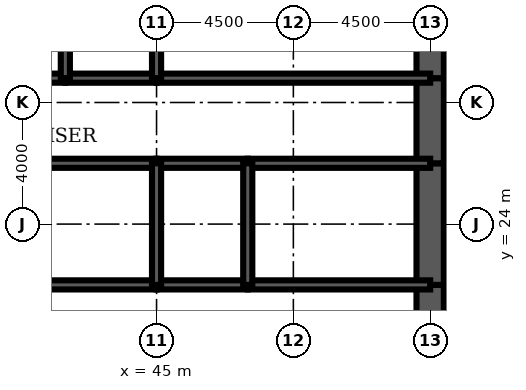
"""IFC4 building model, lengths in metres.
Left out: names, types, materials, properties, quantities, classifications, styles, units other than length and angle.
Written with IfcOpenShell. Run it as: python <this file> out.ifc"""

import sys

from ifc_helpers import new_model, si_unit, direction, frame, frame_2d, origin, place, context, subcontext, project, spatial, rectangle, extrude, element, fill, save


model = new_model("IFC4")
c1 = context("Model", 3, precision=1e-05, world=origin(), true_north=direction((0.0, 1.0)))
c2 = subcontext(c1, "Body", "Model", "MODEL_VIEW")
j1 = project(units=[si_unit("LENGTHUNIT", "METRE"), si_unit("PLANEANGLEUNIT", "RADIAN")], contexts=[c1])
p1 = place(None, origin())
s1 = spatial("IfcSite", under=j1, at=p1, CompositionType="ELEMENT")
p2 = place(p1, origin())
s2 = spatial("IfcBuilding", under=s1, at=p2, CompositionType="ELEMENT")
p3 = place(p2, frame((0.0, 0.0, 150.9)))
s3 = spatial("IfcBuildingStorey", under=s2, at=p3, CompositionType="ELEMENT", Elevation=150.9)
p4 = place(p3, frame((54.0, 19.2, 0.0), z_axis=(0.0, 0.0, 1.0), x_axis=(0.0, 1.0, 0.0)))
e1 = element("IfcWall", 1, at=p4, inside=s3, PredefinedType="SHEAR", context=c2, shape_type="SweptSolid", body=[
    extrude(rectangle(XDim=2.8, YDim=0.9, at=frame_2d((1.4, 0.0))), origin(), (0.0, 0.0, 1.0), 4.2),
])
p5 = place(p4, frame((0.4, 0.0, 0.0)))
e2 = element("IfcOpeningElement", 2, at=p5, cuts=e1, PredefinedType="OPENING", context=c2, shape_type="SweptSolid", body=[
    extrude(rectangle(XDim=1.8, YDim=2.1, at=frame_2d((0.9, 1.05))), frame((0.0, 0.46, 0.0), z_axis=(0.0, -1.0, 0.0), x_axis=(1.0, 0.0, 0.0)), (0.0, 0.0, 1.0), 0.92),
])
p6 = place(p3, frame((54.0, 22.0, 0.0), z_axis=(0.0, 0.0, 1.0), x_axis=(0.0, 1.0, 0.0)))
e3 = element("IfcWall", 3, at=p6, inside=s3, PredefinedType="SHEAR", context=c2, shape_type="SweptSolid", body=[
    extrude(rectangle(XDim=4.0, YDim=0.9, at=frame_2d((2.0, 0.0))), origin(), (0.0, 0.0, 1.0), 4.2),
])
p7 = place(p3, frame((54.0, 26.0, 0.0), z_axis=(0.0, 0.0, 1.0), x_axis=(0.0, 1.0, 0.0)))
e4 = element("IfcWall", 4, at=p7, inside=s3, PredefinedType="SHEAR", context=c2, shape_type="SweptSolid", body=[
    extrude(rectangle(XDim=2.8, YDim=0.9, at=frame_2d((1.4, 0.0))), origin(), (0.0, 0.0, 1.0), 4.2),
])
p8 = place(p7, frame((0.6, 0.0, 0.0)))
e5 = element("IfcOpeningElement", 5, at=p8, cuts=e4, PredefinedType="OPENING", context=c2, shape_type="SweptSolid", body=[
    extrude(rectangle(XDim=1.8, YDim=2.1, at=frame_2d((0.9, 1.05))), frame((0.0, 0.46, 0.0), z_axis=(0.0, -1.0, 0.0), x_axis=(1.0, 0.0, 0.0)), (0.0, 0.0, 1.0), 0.92),
])
p9 = place(p3, frame((54.0, 28.8, 0.0), z_axis=(0.0, 0.0, 1.0), x_axis=(0.0, 1.0, 0.0)))
e6 = element("IfcWall", 6, at=p9, inside=s3, PredefinedType="SHEAR", context=c2, shape_type="SweptSolid", body=[
    extrude(rectangle(XDim=3.2, YDim=0.9, at=frame_2d((1.6, 0.0))), origin(), (0.0, 0.0, 1.0), 4.2),
])
p10 = place(p3, frame((39.0, 28.8, 0.0), z_axis=(0.0, 0.0, 1.0), x_axis=(1.0, 0.0, 0.0)))
e7 = element("IfcWall", 7, at=p10, inside=s3, PredefinedType="SOLIDWALL", context=c2, shape_type="SweptSolid", body=[
    extrude(rectangle(XDim=3.0, YDim=0.3, at=frame_2d((1.5, 0.0))), origin(), (0.0, 0.0, 1.0), 4.2),
])
p11 = place(p3, frame((42.0, 28.8, 0.0), z_axis=(0.0, 0.0, 1.0), x_axis=(1.0, 0.0, 0.0)))
e8 = element("IfcWall", 8, at=p11, inside=s3, PredefinedType="SOLIDWALL", context=c2, shape_type="SweptSolid", body=[
    extrude(rectangle(XDim=3.0, YDim=0.3, at=frame_2d((1.5, 0.0))), origin(), (0.0, 0.0, 1.0), 4.2),
])
p12 = place(p11, frame((0.95, 0.0, 0.0)))
e9 = element("IfcOpeningElement", 9, at=p12, cuts=e8, PredefinedType="OPENING", context=c2, shape_type="SweptSolid", body=[
    extrude(rectangle(XDim=1.1, YDim=2.2, at=frame_2d((0.55, 1.1))), frame((0.0, 0.16, 0.0), z_axis=(0.0, -1.0, 0.0), x_axis=(1.0, 0.0, 0.0)), (0.0, 0.0, 1.0), 0.32),
])
p13 = place(p3, frame((45.0, 28.8, 0.0), z_axis=(0.0, 0.0, 1.0), x_axis=(1.0, 0.0, 0.0)))
e10 = element("IfcWall", 10, at=p13, inside=s3, PredefinedType="SOLIDWALL", context=c2, shape_type="SweptSolid", body=[
    extrude(rectangle(XDim=9.0, YDim=0.3, at=frame_2d((4.5, 0.0))), origin(), (0.0, 0.0, 1.0), 4.2),
])
p14 = place(p13, frame((7.35, 0.0, 0.0)))
e11 = element("IfcOpeningElement", 11, at=p14, cuts=e10, PredefinedType="OPENING", context=c2, shape_type="SweptSolid", body=[
    extrude(rectangle(XDim=1.0, YDim=2.1, at=frame_2d((0.5, 1.05))), frame((0.0, 0.16, 0.0), z_axis=(0.0, -1.0, 0.0), x_axis=(1.0, 0.0, 0.0)), (0.0, 0.0, 1.0), 0.32),
])
p15 = place(p3, frame((36.0, 22.0, 0.0), z_axis=(0.0, 0.0, 1.0), x_axis=(1.0, 0.0, 0.0)))
e12 = element("IfcWall", 12, at=p15, inside=s3, PredefinedType="SOLIDWALL", context=c2, shape_type="SweptSolid", body=[
    extrude(rectangle(XDim=9.0, YDim=0.3, at=frame_2d((4.5, 0.0))), origin(), (0.0, 0.0, 1.0), 4.2),
])
p16 = place(p15, frame((4.0, 0.0, 0.0)))
e13 = element("IfcOpeningElement", 13, at=p16, cuts=e12, PredefinedType="OPENING", context=c2, shape_type="SweptSolid", body=[
    extrude(rectangle(XDim=1.0, YDim=2.1, at=frame_2d((0.5, 1.05))), frame((0.0, 0.16, 0.0), z_axis=(0.0, -1.0, 0.0), x_axis=(1.0, 0.0, 0.0)), (0.0, 0.0, 1.0), 0.32),
])
p17 = place(p3, frame((45.0, 22.0, 0.0), z_axis=(0.0, 0.0, 1.0), x_axis=(1.0, 0.0, 0.0)))
e14 = element("IfcWall", 14, at=p17, inside=s3, PredefinedType="SOLIDWALL", context=c2, shape_type="SweptSolid", body=[
    extrude(rectangle(XDim=3.0, YDim=0.3, at=frame_2d((1.5, 0.0))), origin(), (0.0, 0.0, 1.0), 4.2),
])
p18 = place(p17, frame((1.0, 0.0, 0.0)))
e15 = element("IfcOpeningElement", 15, at=p18, cuts=e14, PredefinedType="OPENING", context=c2, shape_type="SweptSolid", body=[
    extrude(rectangle(XDim=1.0, YDim=2.1, at=frame_2d((0.5, 1.05))), frame((0.0, 0.16, 0.0), z_axis=(0.0, -1.0, 0.0), x_axis=(1.0, 0.0, 0.0)), (0.0, 0.0, 1.0), 0.32),
])
p19 = place(p3, frame((48.0, 22.0, 0.0), z_axis=(0.0, 0.0, 1.0), x_axis=(1.0, 0.0, 0.0)))
e16 = element("IfcWall", 16, at=p19, inside=s3, PredefinedType="SOLIDWALL", context=c2, shape_type="SweptSolid", body=[
    extrude(rectangle(XDim=6.0, YDim=0.3, at=frame_2d((3.0, 0.0))), origin(), (0.0, 0.0, 1.0), 4.2),
])
p20 = place(p19, frame((2.0, 0.0, 0.0)))
e17 = element("IfcOpeningElement", 17, at=p20, cuts=e16, PredefinedType="OPENING", context=c2, shape_type="SweptSolid", body=[
    extrude(rectangle(XDim=1.0, YDim=2.1, at=frame_2d((0.5, 1.05))), frame((0.0, 0.16, 0.0), z_axis=(0.0, -1.0, 0.0), x_axis=(1.0, 0.0, 0.0)), (0.0, 0.0, 1.0), 0.32),
])
p21 = place(p19, frame((4.15, 0.0, 0.0)))
e18 = element("IfcOpeningElement", 18, at=p21, cuts=e16, PredefinedType="OPENING", context=c2, shape_type="SweptSolid", body=[
    extrude(rectangle(XDim=1.0, YDim=2.1, at=frame_2d((0.5, 1.05))), frame((0.0, 0.16, 0.0), z_axis=(0.0, -1.0, 0.0), x_axis=(1.0, 0.0, 0.0)), (0.0, 0.0, 1.0), 0.32),
])
p22 = place(p3, frame((36.0, 26.0, 0.0), z_axis=(0.0, 0.0, 1.0), x_axis=(1.0, 0.0, 0.0)))
e19 = element("IfcWall", 19, at=p22, inside=s3, PredefinedType="SOLIDWALL", context=c2, shape_type="SweptSolid", body=[
    extrude(rectangle(XDim=9.0, YDim=0.3, at=frame_2d((4.5, 0.0))), origin(), (0.0, 0.0, 1.0), 4.2),
])
p23 = place(p3, frame((45.0, 26.0, 0.0), z_axis=(0.0, 0.0, 1.0), x_axis=(1.0, 0.0, 0.0)))
e20 = element("IfcWall", 20, at=p23, inside=s3, PredefinedType="SOLIDWALL", context=c2, shape_type="SweptSolid", body=[
    extrude(rectangle(XDim=3.0, YDim=0.3, at=frame_2d((1.5, 0.0))), origin(), (0.0, 0.0, 1.0), 4.2),
])
p24 = place(p3, frame((48.0, 26.0, 0.0), z_axis=(0.0, 0.0, 1.0), x_axis=(1.0, 0.0, 0.0)))
e21 = element("IfcWall", 21, at=p24, inside=s3, PredefinedType="SOLIDWALL", context=c2, shape_type="SweptSolid", body=[
    extrude(rectangle(XDim=6.0, YDim=0.3, at=frame_2d((3.0, 0.0))), origin(), (0.0, 0.0, 1.0), 4.2),
])
for number, where, z_axis, x_axis in (
    (22, (42.0, 28.8, 0.0), (0.0, 0.0, 1.0), (0.0, 1.0, 0.0)),
    (23, (45.0, 28.8, 0.0), (0.0, 0.0, 1.0), (0.0, 1.0, 0.0)),
):
    element("IfcWall", number, at=place(p3, frame(where, z_axis=z_axis, x_axis=x_axis)), inside=s3, PredefinedType="SOLIDWALL", context=c2, shape_type="SweptSolid", body=[
        extrude(rectangle(XDim=3.2, YDim=0.3, at=frame_2d((1.6, 0.0))), origin(), (0.0, 0.0, 1.0), 4.2),
    ])
for number, where, z_axis, x_axis in (
    (24, (45.0, 22.0, 0.0), (0.0, 0.0, 1.0), (0.0, 1.0, 0.0)),
    (25, (48.0, 22.0, 0.0), (0.0, 0.0, 1.0), (0.0, 1.0, 0.0)),
):
    element("IfcWall", number, at=place(p3, frame(where, z_axis=z_axis, x_axis=x_axis)), inside=s3, PredefinedType="SOLIDWALL", context=c2, shape_type="SweptSolid", body=[
        extrude(rectangle(XDim=4.0, YDim=0.3, at=frame_2d((2.0, 0.0))), origin(), (0.0, 0.0, 1.0), 4.2),
    ])
p25 = place(p3, frame((42.5, 22.15, 0.0), z_axis=(0.0, 0.0, 1.0), x_axis=(0.0, 1.0, 0.0)))
e26 = element("IfcWall", 26, at=p25, inside=s3, PredefinedType="PARTITIONING", context=c2, shape_type="SweptSolid", body=[
    extrude(rectangle(XDim=3.7, YDim=0.15, at=frame_2d((1.85, 0.0))), origin(), (0.0, 0.0, 1.0), 3.0),
])
p26 = place(p25, frame((2.2, 0.0, 0.0)))
e27 = element("IfcOpeningElement", 27, at=p26, cuts=e26, PredefinedType="OPENING", context=c2, shape_type="SweptSolid", body=[
    extrude(rectangle(XDim=1.0, YDim=2.1, at=frame_2d((0.5, 1.05))), frame((0.0, 0.085, 0.0), z_axis=(0.0, -1.0, 0.0), x_axis=(1.0, 0.0, 0.0)), (0.0, 0.0, 1.0), 0.17),
])
p27 = place(p3, frame((51.675, 22.15, 0.0), z_axis=(0.0, 0.0, 1.0), x_axis=(0.0, 1.0, 0.0)))
e28 = element("IfcWall", 28, at=p27, inside=s3, PredefinedType="PARTITIONING", context=c2, shape_type="SweptSolid", body=[
    extrude(rectangle(XDim=3.7, YDim=0.15, at=frame_2d((1.85, 0.0))), origin(), (0.0, 0.0, 1.0), 3.0),
])
p28 = place(p3, frame((46.2, 26.15, 0.0), z_axis=(0.0, 0.0, 1.0), x_axis=(0.0, 1.0, 0.0)))
e29 = element("IfcWall", 29, at=p28, inside=s3, PredefinedType="PARTITIONING", context=c2, shape_type="SweptSolid", body=[
    extrude(rectangle(XDim=2.5, YDim=0.15, at=frame_2d((1.25, 0.0))), origin(), (0.0, 0.0, 1.0), 3.0),
])
p29 = place(p28, frame((1.15, 0.0, 0.0)))
e30 = element("IfcOpeningElement", 30, at=p29, cuts=e29, PredefinedType="OPENING", context=c2, shape_type="SweptSolid", body=[
    extrude(rectangle(XDim=1.0, YDim=2.1, at=frame_2d((0.5, 1.05))), frame((0.0, 0.085, 0.0), z_axis=(0.0, -1.0, 0.0), x_axis=(1.0, 0.0, 0.0)), (0.0, 0.0, 1.0), 0.17),
])
p30 = place(p26, origin())
e31 = element("IfcDoor", 31, at=p30, inside=s3, OperationType="SINGLE_SWING_RIGHT", PredefinedType="DOOR", context=c2, shape_type="SweptSolid", body=[
    extrude(rectangle(XDim=1.0, YDim=2.1, at=frame_2d((0.5, 1.05))), frame((0.0, 0.025, 0.0), z_axis=(0.0, -1.0, 0.0), x_axis=(1.0, 0.0, 0.0)), (0.0, 0.0, 1.0), 0.05),
])
fill(e27, e31)
p31 = place(p29, origin())
e32 = element("IfcDoor", 32, at=p31, inside=s3, OperationType="SINGLE_SWING_RIGHT", PredefinedType="DOOR", context=c2, shape_type="SweptSolid", body=[
    extrude(rectangle(XDim=1.0, YDim=2.1, at=frame_2d((0.5, 1.05))), frame((0.0, 0.025, 0.0), z_axis=(0.0, -1.0, 0.0), x_axis=(1.0, 0.0, 0.0)), (0.0, 0.0, 1.0), 0.05),
])
fill(e30, e32)
p32 = place(p12, origin())
e33 = element("IfcDoor", 33, at=p32, inside=s3, OperationType="DOUBLE_DOOR_SLIDING", PredefinedType="USERDEFINED", context=c2, shape_type="SweptSolid", body=[
    extrude(rectangle(XDim=1.1, YDim=2.2, at=frame_2d((0.55, 1.1))), frame((0.0, 0.025, 0.0), z_axis=(0.0, -1.0, 0.0), x_axis=(1.0, 0.0, 0.0)), (0.0, 0.0, 1.0), 0.05),
])
fill(e9, e33)
p33 = place(p14, origin())
e34 = element("IfcDoor", 34, at=p33, inside=s3, OperationType="SINGLE_SWING_RIGHT", PredefinedType="DOOR", context=c2, shape_type="SweptSolid", body=[
    extrude(rectangle(XDim=1.0, YDim=2.1, at=frame_2d((0.5, 1.05))), frame((0.0, 0.025, 0.0), z_axis=(0.0, -1.0, 0.0), x_axis=(1.0, 0.0, 0.0)), (0.0, 0.0, 1.0), 0.05),
])
fill(e11, e34)
p34 = place(p5, origin())
e35 = element("IfcDoor", 35, at=p34, inside=s3, OperationType="SINGLE_SWING_LEFT", PredefinedType="DOOR", context=c2, shape_type="SweptSolid", body=[
    extrude(rectangle(XDim=1.8, YDim=2.1, at=frame_2d((0.9, 1.05))), frame((0.0, 0.45, 0.0), z_axis=(0.0, -1.0, 0.0), x_axis=(1.0, 0.0, 0.0)), (0.0, 0.0, 1.0), 0.899),
])
fill(e2, e35)
p35 = place(p8, origin())
e36 = element("IfcDoor", 36, at=p35, inside=s3, OperationType="SINGLE_SWING_LEFT", PredefinedType="DOOR", context=c2, shape_type="SweptSolid", body=[
    extrude(rectangle(XDim=1.8, YDim=2.1, at=frame_2d((0.9, 1.05))), frame((0.0, 0.45, 0.0), z_axis=(0.0, -1.0, 0.0), x_axis=(1.0, 0.0, 0.0)), (0.0, 0.0, 1.0), 0.899),
])
fill(e5, e36)
p36 = place(p18, origin())
e37 = element("IfcDoor", 37, at=p36, inside=s3, OperationType="SINGLE_SWING_LEFT", PredefinedType="DOOR", context=c2, shape_type="SweptSolid", body=[
    extrude(rectangle(XDim=1.0, YDim=2.1, at=frame_2d((0.5, 1.05))), frame((0.0, 0.025, 0.0), z_axis=(0.0, -1.0, 0.0), x_axis=(1.0, 0.0, 0.0)), (0.0, 0.0, 1.0), 0.05),
])
fill(e15, e37)
p37 = place(p20, origin())
e38 = element("IfcDoor", 38, at=p37, inside=s3, OperationType="SINGLE_SWING_LEFT", PredefinedType="DOOR", context=c2, shape_type="SweptSolid", body=[
    extrude(rectangle(XDim=1.0, YDim=2.1, at=frame_2d((0.5, 1.05))), frame((0.0, 0.025, 0.0), z_axis=(0.0, -1.0, 0.0), x_axis=(1.0, 0.0, 0.0)), (0.0, 0.0, 1.0), 0.05),
])
fill(e17, e38)
p38 = place(p21, origin())
e39 = element("IfcDoor", 39, at=p38, inside=s3, OperationType="SINGLE_SWING_RIGHT", PredefinedType="DOOR", context=c2, shape_type="SweptSolid", body=[
    extrude(rectangle(XDim=1.0, YDim=2.1, at=frame_2d((0.5, 1.05))), frame((0.0, 0.025, 0.0), z_axis=(0.0, -1.0, 0.0), x_axis=(1.0, 0.0, 0.0)), (0.0, 0.0, 1.0), 0.05),
])
fill(e18, e39)
save(model, sys.argv[1])
